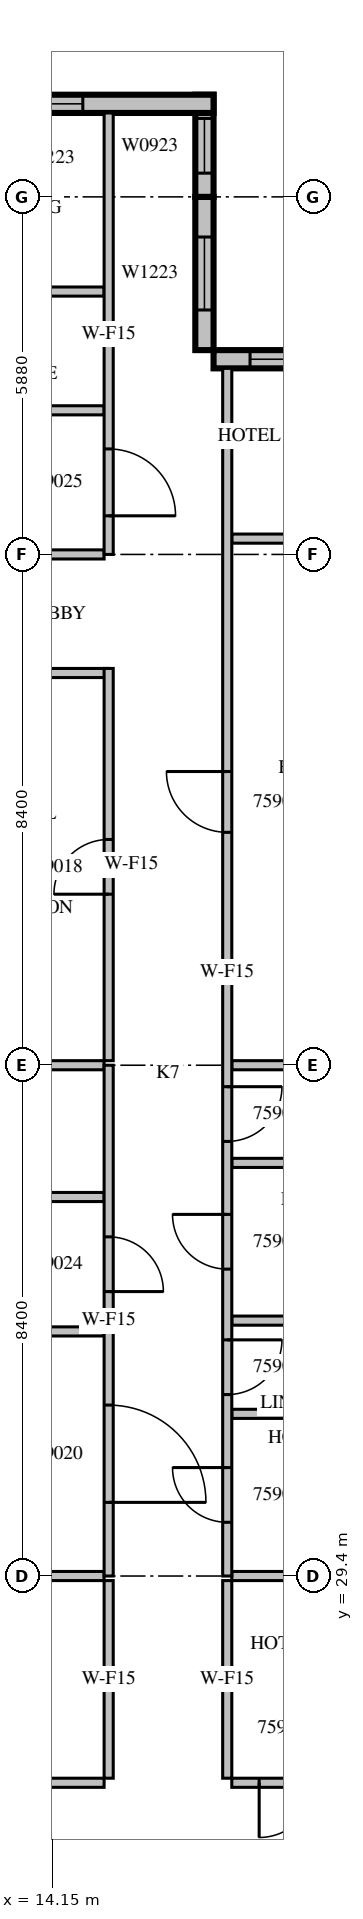
"""IFC4 building model, lengths in metres.
Left out: names, types, materials, properties, quantities, classifications, styles, units other than length and angle.
Written with IfcOpenShell. Run it as: python <this file> out.ifc"""

import sys

from ifc_helpers import new_model, si_unit, direction, frame, frame_2d, origin, place, context, subcontext, project, spatial, rectangle, extrude, source, transform, mapped, element, fill, save


model = new_model("IFC4")
c1 = context("Model", 3, precision=1e-05, world=origin(), true_north=direction((0.0, 1.0)))
c2 = subcontext(c1, "Body", "Model", "MODEL_VIEW")
j1 = project(units=[si_unit("LENGTHUNIT", "METRE"), si_unit("PLANEANGLEUNIT", "RADIAN")], contexts=[c1])
p1 = place(None, origin())
s1 = spatial("IfcSite", under=j1, at=p1, CompositionType="ELEMENT")
p2 = place(p1, origin())
s2 = spatial("IfcBuilding", under=s1, at=p2, CompositionType="ELEMENT")
p3 = place(p2, frame((0.0, 0.0, 257.6)))
s3 = spatial("IfcBuildingStorey", under=s2, at=p3, CompositionType="ELEMENT", Elevation=257.6)
m1 = source(origin(), c2, "Body", "SweptSolid", [
    extrude(rectangle(XDim=4.2, YDim=0.3, at=frame_2d((2.1, 0.0))), origin(), (0.0, 0.0, 1.0), 3.4),
])
p4 = place(p3, frame((21.0, 49.41, 0.0), z_axis=(0.0, 0.0, 1.0), x_axis=(-1.0, 0.0, 0.0)))
e1 = element("IfcWall", 1, at=p4, inside=s3, PredefinedType="STANDARD", context=c2, shape_type="MappedRepresentation", body=[
    mapped(m1, transform((0.0, 0.0, 0.0), scale=1.0)),
])
m2 = source(origin(), c2, "Body", "SweptSolid", [
    extrude(rectangle(XDim=3.0, YDim=2.3, at=frame_2d((1.5, 1.15))), frame((0.0, 0.16, 0.0), z_axis=(0.0, -1.0, 0.0), x_axis=(1.0, 0.0, 0.0)), (0.0, 0.0, 1.0), 0.32),
])
p5 = place(p4, frame((0.6, 0.0, 0.6)))
e2 = element("IfcOpeningElement", 2, at=p5, cuts=e1, PredefinedType="OPENING", context=c2, shape_type="MappedRepresentation", body=[
    mapped(m2, transform((0.0, 0.0, 0.0), scale=1.0)),
])
m3 = source(origin(), c2, "Body", "SweptSolid", [
    extrude(rectangle(XDim=2.52, YDim=0.3, at=frame_2d((1.26, 0.0))), origin(), (0.0, 0.0, 1.0), 3.4),
])
p6 = place(p3, frame((16.65, 49.56, 0.0), z_axis=(0.0, 0.0, 1.0), x_axis=(0.0, 1.0, 0.0)))
e3 = element("IfcWall", 3, at=p6, inside=s3, PredefinedType="STANDARD", context=c2, shape_type="MappedRepresentation", body=[
    mapped(m3, transform((0.0, 0.0, 0.0), scale=1.0)),
])
m4 = source(origin(), c2, "Body", "SweptSolid", [
    extrude(rectangle(XDim=1.2, YDim=2.3, at=frame_2d((0.6, 1.15))), frame((0.0, 0.16, 0.0), z_axis=(0.0, -1.0, 0.0), x_axis=(1.0, 0.0, 0.0)), (0.0, 0.0, 1.0), 0.32),
])
p7 = place(p6, frame((0.66, 0.0, 0.6)))
e4 = element("IfcOpeningElement", 4, at=p7, cuts=e3, PredefinedType="OPENING", context=c2, shape_type="MappedRepresentation", body=[
    mapped(m4, transform((0.0, 0.0, 0.0), scale=1.0)),
])
m5 = source(origin(), c2, "Body", "SweptSolid", [
    extrude(rectangle(XDim=1.68, YDim=0.3, at=frame_2d((0.84, 0.0))), origin(), (0.0, 0.0, 1.0), 3.4),
])
p8 = place(p3, frame((16.65, 52.08, 0.0), z_axis=(0.0, 0.0, 1.0), x_axis=(0.0, 1.0, 0.0)))
e5 = element("IfcWall", 5, at=p8, inside=s3, PredefinedType="STANDARD", context=c2, shape_type="MappedRepresentation", body=[
    mapped(m5, transform((0.0, 0.0, 0.0), scale=1.0)),
])
m6 = source(origin(), c2, "Body", "SweptSolid", [
    extrude(rectangle(XDim=0.9, YDim=2.3, at=frame_2d((0.45, 1.15))), frame((0.0, 0.16, 0.0), z_axis=(0.0, -1.0, 0.0), x_axis=(1.0, 0.0, 0.0)), (0.0, 0.0, 1.0), 0.32),
])
p9 = place(p8, frame((0.39, 0.0, 0.6)))
e6 = element("IfcOpeningElement", 6, at=p9, cuts=e5, PredefinedType="OPENING", context=c2, shape_type="MappedRepresentation", body=[
    mapped(m6, transform((0.0, 0.0, 0.0), scale=1.0)),
])
m7 = source(origin(), c2, "Body", "SweptSolid", [
    extrude(rectangle(XDim=10.5, YDim=0.3, at=frame_2d((5.25, 0.0))), origin(), (0.0, 0.0, 1.0), 3.4),
])
p10 = place(p3, frame((16.8, 53.61, 0.0), z_axis=(0.0, 0.0, 1.0), x_axis=(-1.0, 0.0, 0.0)))
e7 = element("IfcWall", 7, at=p10, inside=s3, PredefinedType="STANDARD", context=c2, shape_type="MappedRepresentation", body=[
    mapped(m7, transform((0.0, 0.0, 0.0), scale=1.0)),
])
p11 = place(p10, frame((2.15, 0.0, 0.6)))
e8 = element("IfcOpeningElement", 8, at=p11, cuts=e7, PredefinedType="OPENING", context=c2, shape_type="MappedRepresentation", body=[
    mapped(m4, transform((0.0, 0.0, 0.0), scale=1.0)),
])
m8 = source(origin(), c2, "Body", "SweptSolid", [
    extrude(rectangle(XDim=1.8, YDim=2.3, at=frame_2d((0.9, 1.15))), frame((0.0, 0.16, 0.0), z_axis=(0.0, -1.0, 0.0), x_axis=(1.0, 0.0, 0.0)), (0.0, 0.0, 1.0), 0.32),
])
p12 = place(p10, frame((8.025, 0.0, 0.6)))
e9 = element("IfcOpeningElement", 9, at=p12, cuts=e7, PredefinedType="OPENING", context=c2, shape_type="MappedRepresentation", body=[
    mapped(m8, transform((0.0, 0.0, 0.0), scale=1.0)),
])
m9 = source(origin(), c2, "Body", "SweptSolid", [
    extrude(rectangle(XDim=8.495, YDim=0.15, at=frame_2d((4.247, 0.0))), origin(), (0.0, 0.0, 1.0), 3.4),
])
p13 = place(p3, frame((6.505, 26.0, 0.0), z_axis=(0.0, 0.0, 1.0), x_axis=(1.0, 0.0, 0.0)))
e10 = element("IfcWall", 10, at=p13, inside=s3, PredefinedType="PARTITIONING", context=c2, shape_type="MappedRepresentation", body=[
    mapped(m9, transform((0.0, 0.0, 0.0), scale=1.0)),
])
m10 = source(origin(), c2, "Body", "SweptSolid", [
    extrude(rectangle(XDim=0.9, YDim=2.1, at=frame_2d((0.45, 1.05))), frame((0.0, 0.085, 0.0), z_axis=(0.0, -1.0, 0.0), x_axis=(1.0, 0.0, 0.0)), (0.0, 0.0, 1.0), 0.17),
])
p14 = place(p13, frame((1.395, 0.0, 0.0)))
e11 = element("IfcOpeningElement", 11, at=p14, cuts=e10, PredefinedType="OPENING", context=c2, shape_type="MappedRepresentation", body=[
    mapped(m10, transform((0.0, 0.0, 0.0), scale=1.0)),
])
p15 = place(p13, frame((6.47, 0.0, 0.0)))
e12 = element("IfcOpeningElement", 12, at=p15, cuts=e10, PredefinedType="OPENING", context=c2, shape_type="MappedRepresentation", body=[
    mapped(m10, transform((0.0, 0.0, 0.0), scale=1.0)),
])
m11 = source(origin(), c2, "Body", "SweptSolid", [
    extrude(rectangle(XDim=3.6, YDim=0.15, at=frame_2d((1.8, 0.0))), origin(), (0.0, 0.0, 1.0), 3.4),
])
p16 = place(p3, frame((17.1, 26.0, 0.0), z_axis=(0.0, 0.0, 1.0), x_axis=(1.0, 0.0, 0.0)))
e13 = element("IfcWall", 13, at=p16, inside=s3, PredefinedType="PARTITIONING", context=c2, shape_type="MappedRepresentation", body=[
    mapped(m11, transform((0.0, 0.0, 0.0), scale=1.0)),
])
p17 = place(p16, frame((0.45, 0.0, 0.0)))
e14 = element("IfcOpeningElement", 14, at=p17, cuts=e13, PredefinedType="OPENING", context=c2, shape_type="MappedRepresentation", body=[
    mapped(m10, transform((0.0, 0.0, 0.0), scale=1.0)),
])
m12 = source(origin(), c2, "Body", "SweptSolid", [
    extrude(rectangle(XDim=3.25, YDim=0.15, at=frame_2d((1.625, 0.0))), origin(), (0.0, 0.0, 1.0), 3.4),
])
for number, where, z_axis, x_axis in (
    (15, (15.075, 26.075, 0.0), (0.0, 0.0, 1.0), (0.0, 1.0, 0.0)),
    (16, (17.025, 29.325, 0.0), (0.0, 0.0, 1.0), (0.0, -1.0, 0.0)),
):
    element("IfcWall", number, at=place(p3, frame(where, z_axis=z_axis, x_axis=x_axis)), inside=s3, PredefinedType="PARTITIONING", context=c2, shape_type="MappedRepresentation", body=[
        mapped(m12, transform((0.0, 0.0, 0.0), scale=1.0)),
    ])
m13 = source(origin(), c2, "Body", "SweptSolid", [
    extrude(rectangle(XDim=4.101, YDim=0.15, at=frame_2d((2.05, 0.0))), origin(), (0.0, 0.0, 1.0), 3.4),
])
p18 = place(p3, frame((15.0, 29.4, 0.0), z_axis=(0.0, 0.0, 1.0), x_axis=(-1.0, 0.0, 0.0)))
e17 = element("IfcWall", 17, at=p18, inside=s3, PredefinedType="PARTITIONING", context=c2, shape_type="MappedRepresentation", body=[
    mapped(m13, transform((0.0, 0.0, 0.0), scale=1.0)),
])
m14 = source(origin(), c2, "Body", "SweptSolid", [
    extrude(rectangle(XDim=3.101, YDim=0.15, at=frame_2d((1.55, 0.0))), origin(), (0.0, 0.0, 1.0), 3.4),
])
p19 = place(p3, frame((20.201, 29.4, 0.0), z_axis=(0.0, 0.0, 1.0), x_axis=(-1.0, 0.0, 0.0)))
e18 = element("IfcWall", 18, at=p19, inside=s3, PredefinedType="PARTITIONING", context=c2, shape_type="MappedRepresentation", body=[
    mapped(m14, transform((0.0, 0.0, 0.0), scale=1.0)),
])
m15 = source(origin(), c2, "Body", "SweptSolid", [
    extrude(rectangle(XDim=2.775, YDim=0.15, at=frame_2d((1.387, 0.0))), origin(), (0.0, 0.0, 1.0), 3.4),
])
p20 = place(p3, frame((15.075, 44.25, 0.0), z_axis=(0.0, 0.0, 1.0), x_axis=(-1.0, 0.0, 0.0)))
e19 = element("IfcWall", 19, at=p20, inside=s3, PredefinedType="PARTITIONING", context=c2, shape_type="MappedRepresentation", body=[
    mapped(m15, transform((0.0, 0.0, 0.0), scale=1.0)),
])
m16 = source(origin(), c2, "Body", "SweptSolid", [
    extrude(rectangle(XDim=6.45, YDim=0.15, at=frame_2d((3.225, 0.0))), origin(), (0.0, 0.0, 1.0), 3.4),
])
p21 = place(p3, frame((15.075, 37.875, 0.0), z_axis=(0.0, 0.0, 1.0), x_axis=(0.0, 1.0, 0.0)))
e20 = element("IfcWall", 20, at=p21, inside=s3, PredefinedType="PARTITIONING", context=c2, shape_type="MappedRepresentation", body=[
    mapped(m16, transform((0.0, 0.0, 0.0), scale=1.0)),
])
p22 = place(p21, frame((2.737, 0.0, 0.0)))
e21 = element("IfcOpeningElement", 21, at=p22, cuts=e20, PredefinedType="OPENING", context=c2, shape_type="MappedRepresentation", body=[
    mapped(m10, transform((0.0, 0.0, 0.0), scale=1.0)),
])
m17 = source(origin(), c2, "Body", "SweptSolid", [
    extrude(rectangle(XDim=3.95, YDim=0.15, at=frame_2d((1.975, 0.0))), origin(), (0.0, 0.0, 1.0), 3.4),
])
for number, where, z_axis, x_axis in (
    (22, (15.0, 33.422, 0.0), (0.0, 0.0, 1.0), (-1.0, 0.0, 0.0)),
    (23, (15.0, 35.633, 0.0), (0.0, 0.0, 1.0), (-1.0, 0.0, 0.0)),
    (24, (15.0, 37.8, 0.0), (0.0, 0.0, 1.0), (-1.0, 0.0, 0.0)),
    (25, (15.0, 48.57, 0.0), (0.0, 0.0, 1.0), (-1.0, 0.0, 0.0)),
    (26, (15.0, 50.523, 0.0), (0.0, 0.0, 1.0), (-1.0, 0.0, 0.0)),
    (27, (15.0, 46.2, 0.0), (0.0, 0.0, 1.0), (-1.0, 0.0, 0.0)),
):
    element("IfcWall", number, at=place(p3, frame(where, z_axis=z_axis, x_axis=x_axis)), inside=s3, PredefinedType="PARTITIONING", context=c2, shape_type="MappedRepresentation", body=[
        mapped(m17, transform((0.0, 0.0, 0.0), scale=1.0)),
    ])
for number, where, z_axis, x_axis in (
    (28, (17.1, 32.067, 0.0), (0.0, 0.0, 1.0), (1.0, 0.0, 0.0)),
    (29, (17.1, 36.194, 0.0), (0.0, 0.0, 1.0), (1.0, 0.0, 0.0)),
):
    element("IfcWall", number, at=place(p3, frame(where, z_axis=z_axis, x_axis=x_axis)), inside=s3, PredefinedType="PARTITIONING", context=c2, shape_type="MappedRepresentation", body=[
        mapped(m11, transform((0.0, 0.0, 0.0), scale=1.0)),
    ])
p23 = place(p3, frame((17.1, 46.46, 0.0), z_axis=(0.0, 0.0, 1.0), x_axis=(1.0, 0.0, 0.0)))
e30 = element("IfcWall", 30, at=p23, inside=s3, PredefinedType="PARTITIONING", context=c2, shape_type="MappedRepresentation", body=[
    mapped(m14, transform((0.0, 0.0, 0.0), scale=1.0)),
])
p24 = place(p23, frame((1.35, 0.0, 0.0)))
e31 = element("IfcOpeningElement", 31, at=p24, cuts=e30, PredefinedType="OPENING", context=c2, shape_type="MappedRepresentation", body=[
    mapped(m10, transform((0.0, 0.0, 0.0), scale=1.0)),
])
p25 = place(p3, frame((20.7, 33.6, 0.0), z_axis=(0.0, 0.0, 1.0), x_axis=(-1.0, 0.0, 0.0)))
e32 = element("IfcWall", 32, at=p25, inside=s3, PredefinedType="PARTITIONING", context=c2, shape_type="MappedRepresentation", body=[
    mapped(m11, transform((0.0, 0.0, 0.0), scale=1.0)),
])
p26 = place(p3, frame((20.201, 37.8, 0.0), z_axis=(0.0, 0.0, 1.0), x_axis=(-1.0, 0.0, 0.0)))
e33 = element("IfcWall", 33, at=p26, inside=s3, PredefinedType="PARTITIONING", context=c2, shape_type="MappedRepresentation", body=[
    mapped(m14, transform((0.0, 0.0, 0.0), scale=1.0)),
])
m18 = source(origin(), c2, "Body", "SweptSolid", [
    extrude(rectangle(XDim=8.4, YDim=0.15, at=frame_2d((4.2, 0.0))), origin(), (0.0, 0.0, 1.0), 3.4),
])
p27 = place(p3, frame((15.075, 29.4, 0.0), z_axis=(0.0, 0.0, 1.0), x_axis=(0.0, 1.0, 0.0)))
e34 = element("IfcWall", 34, at=p27, inside=s3, PredefinedType="PARTITIONING", context=c2, shape_type="MappedRepresentation", body=[
    mapped(m18, transform((0.0, 0.0, 0.0), scale=1.0)),
])
m19 = source(origin(), c2, "Body", "SweptSolid", [
    extrude(rectangle(XDim=1.6, YDim=2.1, at=frame_2d((0.8, 1.05))), frame((0.0, 0.085, 0.0), z_axis=(0.0, -1.0, 0.0), x_axis=(1.0, 0.0, 0.0)), (0.0, 0.0, 1.0), 0.17),
])
p28 = place(p27, frame((1.211, 0.0, 0.0)))
e35 = element("IfcOpeningElement", 35, at=p28, cuts=e34, PredefinedType="OPENING", context=c2, shape_type="MappedRepresentation", body=[
    mapped(m19, transform((0.0, 0.0, 0.0), scale=1.0)),
])
p29 = place(p27, frame((4.678, 0.0, 0.0)))
e36 = element("IfcOpeningElement", 36, at=p29, cuts=e34, PredefinedType="OPENING", context=c2, shape_type="MappedRepresentation", body=[
    mapped(m10, transform((0.0, 0.0, 0.0), scale=1.0)),
])
m20 = source(origin(), c2, "Body", "SweptSolid", [
    extrude(rectangle(XDim=7.26, YDim=0.15, at=frame_2d((3.63, 0.0))), origin(), (0.0, 0.0, 1.0), 3.4),
])
p30 = place(p3, frame((15.075, 46.2, 0.0), z_axis=(0.0, 0.0, 1.0), x_axis=(0.0, 1.0, 0.0)))
e37 = element("IfcWall", 37, at=p30, inside=s3, PredefinedType="PARTITIONING", context=c2, shape_type="MappedRepresentation", body=[
    mapped(m20, transform((0.0, 0.0, 0.0), scale=1.0)),
])
m21 = source(origin(), c2, "Body", "SweptSolid", [
    extrude(rectangle(XDim=1.1, YDim=2.1, at=frame_2d((0.55, 1.05))), frame((0.0, 0.085, 0.0), z_axis=(0.0, -1.0, 0.0), x_axis=(1.0, 0.0, 0.0)), (0.0, 0.0, 1.0), 0.17),
])
p31 = place(p30, frame((0.635, 0.0, 0.0)))
e38 = element("IfcOpeningElement", 38, at=p31, cuts=e37, PredefinedType="OPENING", context=c2, shape_type="MappedRepresentation", body=[
    mapped(m21, transform((0.0, 0.0, 0.0), scale=1.0)),
])
m22 = source(origin(), c2, "Body", "SweptSolid", [
    extrude(rectangle(XDim=19.86, YDim=0.15, at=frame_2d((9.93, 0.0))), origin(), (0.0, 0.0, 1.0), 3.4),
])
p32 = place(p3, frame((17.025, 49.26, 0.0), z_axis=(0.0, 0.0, 1.0), x_axis=(0.0, -1.0, 0.0)))
e39 = element("IfcWall", 39, at=p32, inside=s3, PredefinedType="PARTITIONING", context=c2, shape_type="MappedRepresentation", body=[
    mapped(m22, transform((0.0, 0.0, 0.0), scale=1.0)),
])
p33 = place(p32, frame((18.076, 0.0, 0.0)))
e40 = element("IfcOpeningElement", 40, at=p33, cuts=e39, PredefinedType="OPENING", context=c2, shape_type="MappedRepresentation", body=[
    mapped(m10, transform((0.0, 0.0, 0.0), scale=1.0)),
])
p34 = place(p32, frame((15.976, 0.0, 0.0)))
e41 = element("IfcOpeningElement", 41, at=p34, cuts=e39, PredefinedType="OPENING", context=c2, shape_type="MappedRepresentation", body=[
    mapped(m10, transform((0.0, 0.0, 0.0), scale=1.0)),
])
p35 = place(p32, frame((13.913, 0.0, 0.0)))
e42 = element("IfcOpeningElement", 42, at=p35, cuts=e39, PredefinedType="OPENING", context=c2, shape_type="MappedRepresentation", body=[
    mapped(m10, transform((0.0, 0.0, 0.0), scale=1.0)),
])
p36 = place(p32, frame((11.813, 0.0, 0.0)))
e43 = element("IfcOpeningElement", 43, at=p36, cuts=e39, PredefinedType="OPENING", context=c2, shape_type="MappedRepresentation", body=[
    mapped(m10, transform((0.0, 0.0, 0.0), scale=1.0)),
])
m23 = source(origin(), c2, "Body", "SweptSolid", [
    extrude(rectangle(XDim=1.0, YDim=2.1, at=frame_2d((0.5, 1.05))), frame((0.0, 0.085, 0.0), z_axis=(0.0, -1.0, 0.0), x_axis=(1.0, 0.0, 0.0)), (0.0, 0.0, 1.0), 0.17),
])
p37 = place(p32, frame((6.63, 0.0, 0.0)))
e44 = element("IfcOpeningElement", 44, at=p37, cuts=e39, PredefinedType="OPENING", context=c2, shape_type="MappedRepresentation", body=[
    mapped(m23, transform((0.0, 0.0, 0.0), scale=1.0)),
])
m24 = source(origin(), c2, "Body", "SweptSolid", [
    extrude(rectangle(XDim=3.0, YDim=2.3, at=frame_2d((1.5, 1.15))), frame((0.0, 0.03, 0.0), z_axis=(0.0, -1.0, 0.0), x_axis=(1.0, 0.0, 0.0)), (0.0, 0.0, 1.0), 0.06),
])
p38 = place(p5, origin())
e45 = element("IfcWindow", 45, at=p38, inside=s3, PartitioningType="SINGLE_PANEL", PredefinedType="WINDOW", context=c2, shape_type="MappedRepresentation", body=[
    mapped(m24, transform((0.0, 0.0, 0.0), scale=1.0)),
])
fill(e2, e45)
m25 = source(origin(), c2, "Body", "SweptSolid", [
    extrude(rectangle(XDim=1.2, YDim=2.3, at=frame_2d((0.6, 1.15))), frame((0.0, 0.03, 0.0), z_axis=(0.0, -1.0, 0.0), x_axis=(1.0, 0.0, 0.0)), (0.0, 0.0, 1.0), 0.06),
])
p39 = place(p7, origin())
e46 = element("IfcWindow", 46, at=p39, inside=s3, PartitioningType="SINGLE_PANEL", PredefinedType="WINDOW", context=c2, shape_type="MappedRepresentation", body=[
    mapped(m25, transform((0.0, 0.0, 0.0), scale=1.0)),
])
fill(e4, e46)
m26 = source(origin(), c2, "Body", "SweptSolid", [
    extrude(rectangle(XDim=0.9, YDim=2.3, at=frame_2d((0.45, 1.15))), frame((0.0, 0.03, 0.0), z_axis=(0.0, -1.0, 0.0), x_axis=(1.0, 0.0, 0.0)), (0.0, 0.0, 1.0), 0.06),
])
p40 = place(p9, origin())
e47 = element("IfcWindow", 47, at=p40, inside=s3, PartitioningType="SINGLE_PANEL", PredefinedType="WINDOW", context=c2, shape_type="MappedRepresentation", body=[
    mapped(m26, transform((0.0, 0.0, 0.0), scale=1.0)),
])
fill(e6, e47)
p41 = place(p11, origin())
e48 = element("IfcWindow", 48, at=p41, inside=s3, PartitioningType="SINGLE_PANEL", PredefinedType="WINDOW", context=c2, shape_type="MappedRepresentation", body=[
    mapped(m25, transform((0.0, 0.0, 0.0), scale=1.0)),
])
fill(e8, e48)
m27 = source(origin(), c2, "Body", "SweptSolid", [
    extrude(rectangle(XDim=0.9, YDim=2.1, at=frame_2d((0.45, 1.05))), frame((0.0, 0.025, 0.0), z_axis=(0.0, -1.0, 0.0), x_axis=(1.0, 0.0, 0.0)), (0.0, 0.0, 1.0), 0.05),
])
p42 = place(p17, origin())
e49 = element("IfcDoor", 49, at=p42, inside=s3, OperationType="SINGLE_SWING_RIGHT", PredefinedType="DOOR", context=c2, shape_type="MappedRepresentation", body=[
    mapped(m27, transform((0.0, 0.0, 0.0), scale=1.0)),
])
fill(e14, e49)
p43 = place(p22, origin())
e50 = element("IfcDoor", 50, at=p43, inside=s3, OperationType="SINGLE_SWING_LEFT", PredefinedType="DOOR", context=c2, shape_type="MappedRepresentation", body=[
    mapped(m27, transform((0.0, 0.0, 0.0), scale=1.0)),
])
fill(e21, e50)
m28 = source(origin(), c2, "Body", "SweptSolid", [
    extrude(rectangle(XDim=1.6, YDim=2.1, at=frame_2d((0.8, 1.05))), frame((0.0, 0.025, 0.0), z_axis=(0.0, -1.0, 0.0), x_axis=(1.0, 0.0, 0.0)), (0.0, 0.0, 1.0), 0.05),
])
p44 = place(p28, origin())
e51 = element("IfcDoor", 51, at=p44, inside=s3, OperationType="SINGLE_SWING_RIGHT", PredefinedType="DOOR", context=c2, shape_type="MappedRepresentation", body=[
    mapped(m28, transform((0.0, 0.0, 0.0), scale=1.0)),
])
fill(e35, e51)
p45 = place(p29, origin())
e52 = element("IfcDoor", 52, at=p45, inside=s3, OperationType="SINGLE_SWING_RIGHT", PredefinedType="DOOR", context=c2, shape_type="MappedRepresentation", body=[
    mapped(m27, transform((0.0, 0.0, 0.0), scale=1.0)),
])
fill(e36, e52)
m29 = source(origin(), c2, "Body", "SweptSolid", [
    extrude(rectangle(XDim=1.1, YDim=2.1, at=frame_2d((0.55, 1.05))), frame((0.0, 0.025, 0.0), z_axis=(0.0, -1.0, 0.0), x_axis=(1.0, 0.0, 0.0)), (0.0, 0.0, 1.0), 0.05),
])
p46 = place(p31, origin())
e53 = element("IfcDoor", 53, at=p46, inside=s3, OperationType="SINGLE_SWING_RIGHT", PredefinedType="DOOR", context=c2, shape_type="MappedRepresentation", body=[
    mapped(m29, transform((0.0, 0.0, 0.0), scale=1.0)),
])
fill(e38, e53)
p47 = place(p33, origin())
e54 = element("IfcDoor", 54, at=p47, inside=s3, OperationType="SINGLE_SWING_RIGHT", PredefinedType="DOOR", context=c2, shape_type="MappedRepresentation", body=[
    mapped(m27, transform((0.0, 0.0, 0.0), scale=1.0)),
])
fill(e40, e54)
p48 = place(p34, origin())
e55 = element("IfcDoor", 55, at=p48, inside=s3, OperationType="SINGLE_SWING_LEFT", PredefinedType="DOOR", context=c2, shape_type="MappedRepresentation", body=[
    mapped(m27, transform((0.0, 0.0, 0.0), scale=1.0)),
])
fill(e41, e55)
p49 = place(p35, origin())
e56 = element("IfcDoor", 56, at=p49, inside=s3, OperationType="SINGLE_SWING_RIGHT", PredefinedType="DOOR", context=c2, shape_type="MappedRepresentation", body=[
    mapped(m27, transform((0.0, 0.0, 0.0), scale=1.0)),
])
fill(e42, e56)
p50 = place(p36, origin())
e57 = element("IfcDoor", 57, at=p50, inside=s3, OperationType="SINGLE_SWING_LEFT", PredefinedType="DOOR", context=c2, shape_type="MappedRepresentation", body=[
    mapped(m27, transform((0.0, 0.0, 0.0), scale=1.0)),
])
fill(e43, e57)
m30 = source(origin(), c2, "Body", "SweptSolid", [
    extrude(rectangle(XDim=1.0, YDim=2.1, at=frame_2d((0.5, 1.05))), frame((0.0, 0.025, 0.0), z_axis=(0.0, -1.0, 0.0), x_axis=(1.0, 0.0, 0.0)), (0.0, 0.0, 1.0), 0.05),
])
p51 = place(p37, origin())
e58 = element("IfcDoor", 58, at=p51, inside=s3, OperationType="SINGLE_SWING_RIGHT", PredefinedType="DOOR", context=c2, shape_type="MappedRepresentation", body=[
    mapped(m30, transform((0.0, 0.0, 0.0), scale=1.0)),
])
fill(e44, e58)
save(model, sys.argv[1])
